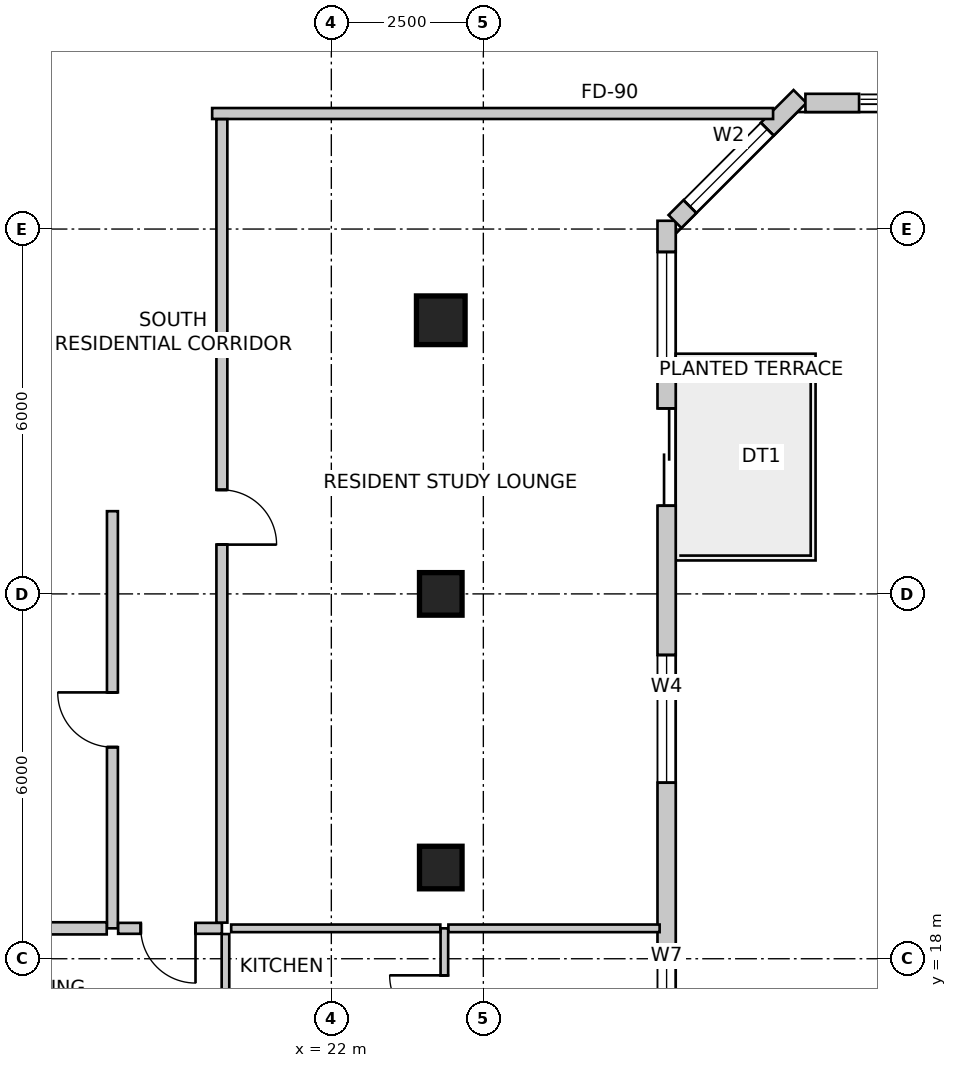
"""IFC4 building model, lengths in metres.
Left out: names, types, materials, properties, quantities, classifications, styles, units other than length and angle.
Written with IfcOpenShell. Run it as: python <this file> out.ifc"""

import sys

from ifc_helpers import new_model, si_unit, direction, frame, frame_2d, origin, origin_2d, place, context, subcontext, project, spatial, rectangle, extrude, source, transform, mapped, element, fill, save


model = new_model("IFC4")
c1 = context("Model", 3, precision=1e-05, world=origin(), true_north=direction((0.0, 1.0)))
c2 = subcontext(c1, "Body", "Model", "MODEL_VIEW")
j1 = project(units=[si_unit("LENGTHUNIT", "METRE"), si_unit("PLANEANGLEUNIT", "RADIAN")], contexts=[c1])
p1 = place(None, origin())
s1 = spatial("IfcSite", under=j1, at=p1, CompositionType="ELEMENT")
p2 = place(p1, origin())
s2 = spatial("IfcBuilding", under=s1, at=p2, CompositionType="ELEMENT")
p3 = place(p2, frame((0.0, 0.0, 197.4)))
s3 = spatial("IfcBuildingStorey", under=s2, at=p3, CompositionType="ELEMENT", Elevation=197.4)
m1 = source(origin(), c2, "Body", "SweptSolid", [
    extrude(rectangle(XDim=0.8, YDim=0.8, at=origin_2d()), origin(), (0.0, 0.0, 1.0), 3.5),
])
p4 = place(p3, frame((23.8, 28.5, 0.0), z_axis=(0.0, 0.0, 1.0), x_axis=(1.0, 0.0, 0.0)))
e1 = element("IfcColumn", 1, at=p4, inside=s3, PredefinedType="COLUMN", context=c2, shape_type="MappedRepresentation", body=[
    mapped(m1, transform((0.0, 0.0, 0.0), scale=1.0)),
])
m2 = source(origin(), c2, "Body", "SweptSolid", [
    extrude(rectangle(XDim=0.7, YDim=0.7, at=origin_2d()), origin(), (0.0, 0.0, 1.0), 3.5),
])
for number, where, z_axis, x_axis in (
    (2, (23.8, 24.0, 0.0), (0.0, 0.0, 1.0), (1.0, 0.0, 0.0)),
    (3, (23.8, 19.5, 0.0), (0.0, 0.0, 1.0), (1.0, 0.0, 0.0)),
):
    element("IfcColumn", number, at=place(p3, frame(where, z_axis=z_axis, x_axis=x_axis)), inside=s3, PredefinedType="COLUMN", context=c2, shape_type="MappedRepresentation", body=[
        mapped(m2, transform((0.0, 0.0, 0.0), scale=1.0)),
    ])
p5 = place(p3, frame((27.514, 16.457, 0.0), z_axis=(0.0, 0.0, 1.0), x_axis=(0.0, 1.0, 0.0)))
e4 = element("IfcWall", 4, at=p5, inside=s3, PredefinedType="SOLIDWALL", context=c2, shape_type="SweptSolid", body=[
    extrude(rectangle(XDim=13.679, YDim=0.3, at=frame_2d((6.839, 0.0))), origin(), (0.0, 0.0, 1.0), 3.25),
])
m3 = source(origin(), c2, "Body", "SweptSolid", [
    extrude(rectangle(XDim=1.6, YDim=2.15, at=frame_2d((0.8, 1.075))), frame((0.0, 0.16, 0.0), z_axis=(0.0, -1.0, 0.0), x_axis=(1.0, 0.0, 0.0)), (0.0, 0.0, 1.0), 0.32),
])
p6 = place(p5, frame((8.993, 0.0, 0.0)))
e5 = element("IfcOpeningElement", 5, at=p6, cuts=e4, PredefinedType="OPENING", context=c2, shape_type="MappedRepresentation", body=[
    mapped(m3, transform((0.0, 0.0, 0.0), scale=1.0)),
])
m4 = source(origin(), c2, "Body", "SweptSolid", [
    extrude(rectangle(XDim=0.9, YDim=1.6, at=frame_2d((0.45, 0.8))), frame((0.0, 0.16, 0.0), z_axis=(0.0, -1.0, 0.0), x_axis=(1.0, 0.0, 0.0)), (0.0, 0.0, 1.0), 0.32),
])
p7 = place(p5, frame((0.621, 0.0, 0.85)))
e6 = element("IfcOpeningElement", 6, at=p7, cuts=e4, PredefinedType="OPENING", context=c2, shape_type="MappedRepresentation", body=[
    mapped(m4, transform((0.0, 0.0, 0.0), scale=1.0)),
])
m5 = source(origin(), c2, "Body", "SweptSolid", [
    extrude(rectangle(XDim=2.1, YDim=2.0, at=frame_2d((1.05, 1.0))), frame((0.0, 0.16, 0.0), z_axis=(0.0, -1.0, 0.0), x_axis=(1.0, 0.0, 0.0)), (0.0, 0.0, 1.0), 0.32),
])
p8 = place(p5, frame((4.438, 0.0, 0.85)))
e7 = element("IfcOpeningElement", 7, at=p8, cuts=e4, PredefinedType="OPENING", context=c2, shape_type="MappedRepresentation", body=[
    mapped(m5, transform((0.0, 0.0, 0.0), scale=1.0)),
])
p9 = place(p5, frame((11.066, 0.0, 0.85)))
e8 = element("IfcOpeningElement", 8, at=p9, cuts=e4, PredefinedType="OPENING", context=c2, shape_type="MappedRepresentation", body=[
    mapped(m5, transform((0.0, 0.0, 0.0), scale=1.0)),
])
p10 = place(p3, frame((27.652, 30.124, 0.0), z_axis=(0.0, 0.0, 1.0), x_axis=(0.707064797706, 0.707148762175, 0.0)))
e9 = element("IfcWall", 9, at=p10, inside=s3, PredefinedType="SOLIDWALL", context=c2, shape_type="SweptSolid", body=[
    extrude(rectangle(XDim=2.908, YDim=0.3, at=frame_2d((1.454, 0.0))), origin(), (0.0, 0.0, 1.0), 3.25),
])
m6 = source(origin(), c2, "Body", "SweptSolid", [
    extrude(rectangle(XDim=1.8, YDim=2.1, at=frame_2d((0.9, 1.05))), frame((0.0, 0.16, 0.0), z_axis=(0.0, -1.0, 0.0), x_axis=(1.0, 0.0, 0.0)), (0.0, 0.0, 1.0), 0.32),
])
p11 = place(p10, frame((0.348, 0.0, 0.85)))
e10 = element("IfcOpeningElement", 10, at=p11, cuts=e9, PredefinedType="OPENING", context=c2, shape_type="MappedRepresentation", body=[
    mapped(m6, transform((0.0, 0.0, 0.0), scale=1.0)),
])
p12 = place(p3, frame((29.797, 32.074, 0.0), z_axis=(0.0, 0.0, 1.0), x_axis=(1.0, 0.0, 0.0)))
e11 = element("IfcWall", 11, at=p12, inside=s3, PredefinedType="SOLIDWALL", context=c2, shape_type="SweptSolid", body=[
    extrude(rectangle(XDim=0.882, YDim=0.3, at=frame_2d((0.441, 0.0))), origin(), (0.0, 0.0, 1.0), 3.25),
])
p13 = place(p3, frame((29.265, 31.9, 0.0), z_axis=(0.0, 0.0, 1.0), x_axis=(-1.0, 0.0, 0.0)))
e12 = element("IfcWall", 12, at=p13, inside=s3, PredefinedType="PARTITIONING", context=c2, shape_type="SweptSolid", body=[
    extrude(rectangle(XDim=9.225, YDim=0.18, at=frame_2d((4.613, 0.0))), origin(), (0.0, 0.0, 1.0), 2.919),
])
p14 = place(p3, frame((18.4, 18.5, 0.0), z_axis=(0.0, 0.0, 1.0), x_axis=(0.0, 1.0, 0.0)))
e13 = element("IfcWall", 13, at=p14, inside=s3, PredefinedType="PARTITIONING", context=c2, shape_type="SweptSolid", body=[
    extrude(rectangle(XDim=6.86, YDim=0.18, at=frame_2d((3.43, 0.0))), origin(), (0.0, 0.0, 1.0), 2.766),
])
m7 = source(origin(), c2, "Body", "SweptSolid", [
    extrude(rectangle(XDim=0.9, YDim=2.15, at=frame_2d((0.45, 1.075))), frame((0.0, 0.1, 0.0), z_axis=(0.0, -1.0, 0.0), x_axis=(1.0, 0.0, 0.0)), (0.0, 0.0, 1.0), 0.2),
])
p15 = place(p14, frame((2.98, 0.0, 0.0)))
e14 = element("IfcOpeningElement", 14, at=p15, cuts=e13, PredefinedType="OPENING", context=c2, shape_type="MappedRepresentation", body=[
    mapped(m7, transform((0.0, 0.0, 0.0), scale=1.0)),
])
p16 = place(p3, frame((20.2, 18.5, 0.0), z_axis=(0.0, 0.0, 1.0), x_axis=(-1.0, 0.0, 0.0)))
e15 = element("IfcWall", 15, at=p16, inside=s3, PredefinedType="PARTITIONING", context=c2, shape_type="SweptSolid", body=[
    extrude(rectangle(XDim=1.706, YDim=0.18, at=frame_2d((0.853, 0.0))), origin(), (0.0, 0.0, 1.0), 3.25),
])
p17 = place(p16, frame((0.434, 0.0, 0.0)))
e16 = element("IfcOpeningElement", 16, at=p17, cuts=e15, PredefinedType="OPENING", context=c2, shape_type="MappedRepresentation", body=[
    mapped(m7, transform((0.0, 0.0, 0.0), scale=1.0)),
])
p18 = place(p3, frame((20.2, 31.806, 0.0), z_axis=(0.0, 0.0, 1.0), x_axis=(0.0, -1.0, 0.0)))
e17 = element("IfcWall", 17, at=p18, inside=s3, PredefinedType="PARTITIONING", context=c2, shape_type="SweptSolid", body=[
    extrude(rectangle(XDim=13.212, YDim=0.18, at=frame_2d((6.606, 0.0))), origin(), (0.0, 0.0, 1.0), 2.766),
])
p19 = place(p18, frame((6.095, 0.0, 0.0)))
e18 = element("IfcOpeningElement", 18, at=p19, cuts=e17, PredefinedType="OPENING", context=c2, shape_type="MappedRepresentation", body=[
    mapped(m7, transform((0.0, 0.0, 0.0), scale=1.0)),
])
p20 = place(p3, frame((18.306, 18.5, 0.0), z_axis=(0.0, 0.0, 1.0), x_axis=(-1.0, 0.0, 0.0)))
e19 = element("IfcWall", 19, at=p20, inside=s3, PredefinedType="PARTITIONING", context=c2, shape_type="SweptSolid", body=[
    extrude(rectangle(XDim=7.246, YDim=0.2, at=frame_2d((3.623, 0.0))), origin(), (0.0, 0.0, 1.0), 3.25),
])
p21 = place(p3, frame((23.859, 15.315, 0.0), z_axis=(0.0, 0.0, 1.0), x_axis=(0.0, 1.0, 0.0)))
e20 = element("IfcWall", 20, at=p21, inside=s3, PredefinedType="PARTITIONING", context=c2, shape_type="SweptSolid", body=[
    extrude(rectangle(XDim=3.185, YDim=0.125, at=frame_2d((1.593, 0.0))), origin(), (0.0, 0.0, 1.0), 2.542),
])
m8 = source(origin(), c2, "Body", "SweptSolid", [
    extrude(rectangle(XDim=0.9, YDim=2.15, at=frame_2d((0.45, 1.075))), frame((0.0, 0.073, 0.0), z_axis=(0.0, -1.0, 0.0), x_axis=(1.0, 0.0, 0.0)), (0.0, 0.0, 1.0), 0.145),
])
p22 = place(p21, frame((1.512, 0.0, 0.0)))
e21 = element("IfcOpeningElement", 21, at=p22, cuts=e20, PredefinedType="OPENING", context=c2, shape_type="MappedRepresentation", body=[
    mapped(m8, transform((0.0, 0.0, 0.0), scale=1.0)),
])
p23 = place(p3, frame((23.926, 18.5, 0.0), z_axis=(0.0, 0.0, 1.0), x_axis=(1.0, 0.0, 0.0)))
e22 = element("IfcWall", 22, at=p23, inside=s3, PredefinedType="PARTITIONING", context=c2, shape_type="SweptSolid", body=[
    extrude(rectangle(XDim=3.473, YDim=0.125, at=frame_2d((1.737, 0.0))), origin(), (0.0, 0.0, 1.0), 3.25),
])
p24 = place(p3, frame((20.259, 18.406, 0.0), z_axis=(0.0, 0.0, 1.0), x_axis=(0.0, -1.0, 0.0)))
e23 = element("IfcWall", 23, at=p24, inside=s3, PredefinedType="PARTITIONING", context=c2, shape_type="SweptSolid", body=[
    extrude(rectangle(XDim=3.091, YDim=0.125, at=frame_2d((1.545, 0.0))), origin(), (0.0, 0.0, 1.0), 2.779),
])
m9 = source(origin(), c2, "Body", "SweptSolid", [
    extrude(rectangle(XDim=0.85, YDim=2.15, at=frame_2d((0.425, 1.075))), frame((0.0, 0.073, 0.0), z_axis=(0.0, -1.0, 0.0), x_axis=(1.0, 0.0, 0.0)), (0.0, 0.0, 1.0), 0.145),
])
p25 = place(p24, frame((1.121, 0.0, 0.0)))
e24 = element("IfcOpeningElement", 24, at=p25, cuts=e23, PredefinedType="OPENING", context=c2, shape_type="MappedRepresentation", body=[
    mapped(m9, transform((0.0, 0.0, 0.0), scale=1.0)),
])
p26 = place(p3, frame((20.353, 18.5, 0.0), z_axis=(0.0, 0.0, 1.0), x_axis=(1.0, 0.0, 0.0)))
e25 = element("IfcWall", 25, at=p26, inside=s3, PredefinedType="PARTITIONING", context=c2, shape_type="SweptSolid", body=[
    extrude(rectangle(XDim=3.439, YDim=0.125, at=frame_2d((1.72, 0.0))), origin(), (0.0, 0.0, 1.0), 2.542),
])
m10 = source(origin(), c2, "Body", "SweptSolid", [
    extrude(rectangle(XDim=1.6, YDim=2.15, at=frame_2d((0.8, 1.075))), frame((0.0, 0.025, 0.0), z_axis=(0.0, -1.0, 0.0), x_axis=(1.0, 0.0, 0.0)), (0.0, 0.0, 1.0), 0.05),
])
p27 = place(p6, origin())
e26 = element("IfcDoor", 26, at=p27, inside=s3, OperationType="DOUBLE_DOOR_SLIDING", PredefinedType="DOOR", context=c2, shape_type="MappedRepresentation", body=[
    mapped(m10, transform((0.0, 0.0, 0.0), scale=1.0)),
])
fill(e5, e26)
m11 = source(origin(), c2, "Body", "SweptSolid", [
    extrude(rectangle(XDim=0.9, YDim=1.6, at=frame_2d((0.45, 0.8))), frame((0.0, -0.015, 0.0), z_axis=(0.0, -1.0, 0.0), x_axis=(1.0, 0.0, 0.0)), (0.0, 0.0, 1.0), 0.06),
])
p28 = place(p7, origin())
e27 = element("IfcWindow", 27, at=p28, inside=s3, PartitioningType="SINGLE_PANEL", PredefinedType="WINDOW", context=c2, shape_type="MappedRepresentation", body=[
    mapped(m11, transform((0.0, 0.0, 0.0), scale=1.0)),
])
fill(e6, e27)
m12 = source(origin(), c2, "Body", "SweptSolid", [
    extrude(rectangle(XDim=2.1, YDim=2.0, at=frame_2d((1.05, 1.0))), frame((0.0, -0.015, 0.0), z_axis=(0.0, -1.0, 0.0), x_axis=(1.0, 0.0, 0.0)), (0.0, 0.0, 1.0), 0.06),
])
p29 = place(p8, origin())
e28 = element("IfcWindow", 28, at=p29, inside=s3, PartitioningType="SINGLE_PANEL", PredefinedType="WINDOW", context=c2, shape_type="MappedRepresentation", body=[
    mapped(m12, transform((0.0, 0.0, 0.0), scale=1.0)),
])
fill(e7, e28)
p30 = place(p9, origin())
e29 = element("IfcWindow", 29, at=p30, inside=s3, PartitioningType="SINGLE_PANEL", PredefinedType="WINDOW", context=c2, shape_type="MappedRepresentation", body=[
    mapped(m12, transform((0.0, 0.0, 0.0), scale=1.0)),
])
fill(e8, e29)
m13 = source(origin(), c2, "Body", "SweptSolid", [
    extrude(rectangle(XDim=1.8, YDim=2.1, at=frame_2d((0.9, 1.05))), frame((0.0, -0.015, 0.0), z_axis=(0.0, -1.0, 0.0), x_axis=(1.0, 0.0, 0.0)), (0.0, 0.0, 1.0), 0.06),
])
p31 = place(p11, origin())
e30 = element("IfcWindow", 30, at=p31, inside=s3, PartitioningType="SINGLE_PANEL", PredefinedType="WINDOW", context=c2, shape_type="MappedRepresentation", body=[
    mapped(m13, transform((0.0, 0.0, 0.0), scale=1.0)),
])
fill(e10, e30)
m14 = source(origin(), c2, "Body", "SweptSolid", [
    extrude(rectangle(XDim=0.9, YDim=2.15, at=frame_2d((0.45, 1.075))), frame((0.0, 0.025, 0.0), z_axis=(0.0, -1.0, 0.0), x_axis=(1.0, 0.0, 0.0)), (0.0, 0.0, 1.0), 0.05),
])
p32 = place(p15, origin())
e31 = element("IfcDoor", 31, at=p32, inside=s3, OperationType="SINGLE_SWING_RIGHT", PredefinedType="DOOR", context=c2, shape_type="MappedRepresentation", body=[
    mapped(m14, transform((0.0, 0.0, 0.0), scale=1.0)),
])
fill(e14, e31)
m15 = source(origin(), c2, "Body", "SweptSolid", [
    extrude(rectangle(XDim=0.9, YDim=2.15, at=frame_2d((0.45, 1.075))), frame((0.0, 0.025, 0.0), z_axis=(0.0, -1.0, 0.0), x_axis=(1.0, 0.0, 0.0)), (0.0, 0.0, 1.0), 0.05),
])
p33 = place(p22, origin())
e32 = element("IfcDoor", 32, at=p33, inside=s3, OperationType="SINGLE_SWING_RIGHT", PredefinedType="DOOR", context=c2, shape_type="MappedRepresentation", body=[
    mapped(m15, transform((0.0, 0.0, 0.0), scale=1.0)),
])
fill(e21, e32)
p34 = place(p17, origin())
e33 = element("IfcDoor", 33, at=p34, inside=s3, OperationType="SINGLE_SWING_LEFT", PredefinedType="DOOR", context=c2, shape_type="MappedRepresentation", body=[
    mapped(m14, transform((0.0, 0.0, 0.0), scale=1.0)),
])
fill(e16, e33)
p35 = place(p19, origin())
e34 = element("IfcDoor", 34, at=p35, inside=s3, OperationType="SINGLE_SWING_RIGHT", PredefinedType="DOOR", context=c2, shape_type="MappedRepresentation", body=[
    mapped(m15, transform((0.0, 0.0, 0.0), scale=1.0)),
])
fill(e18, e34)
save(model, sys.argv[1])
